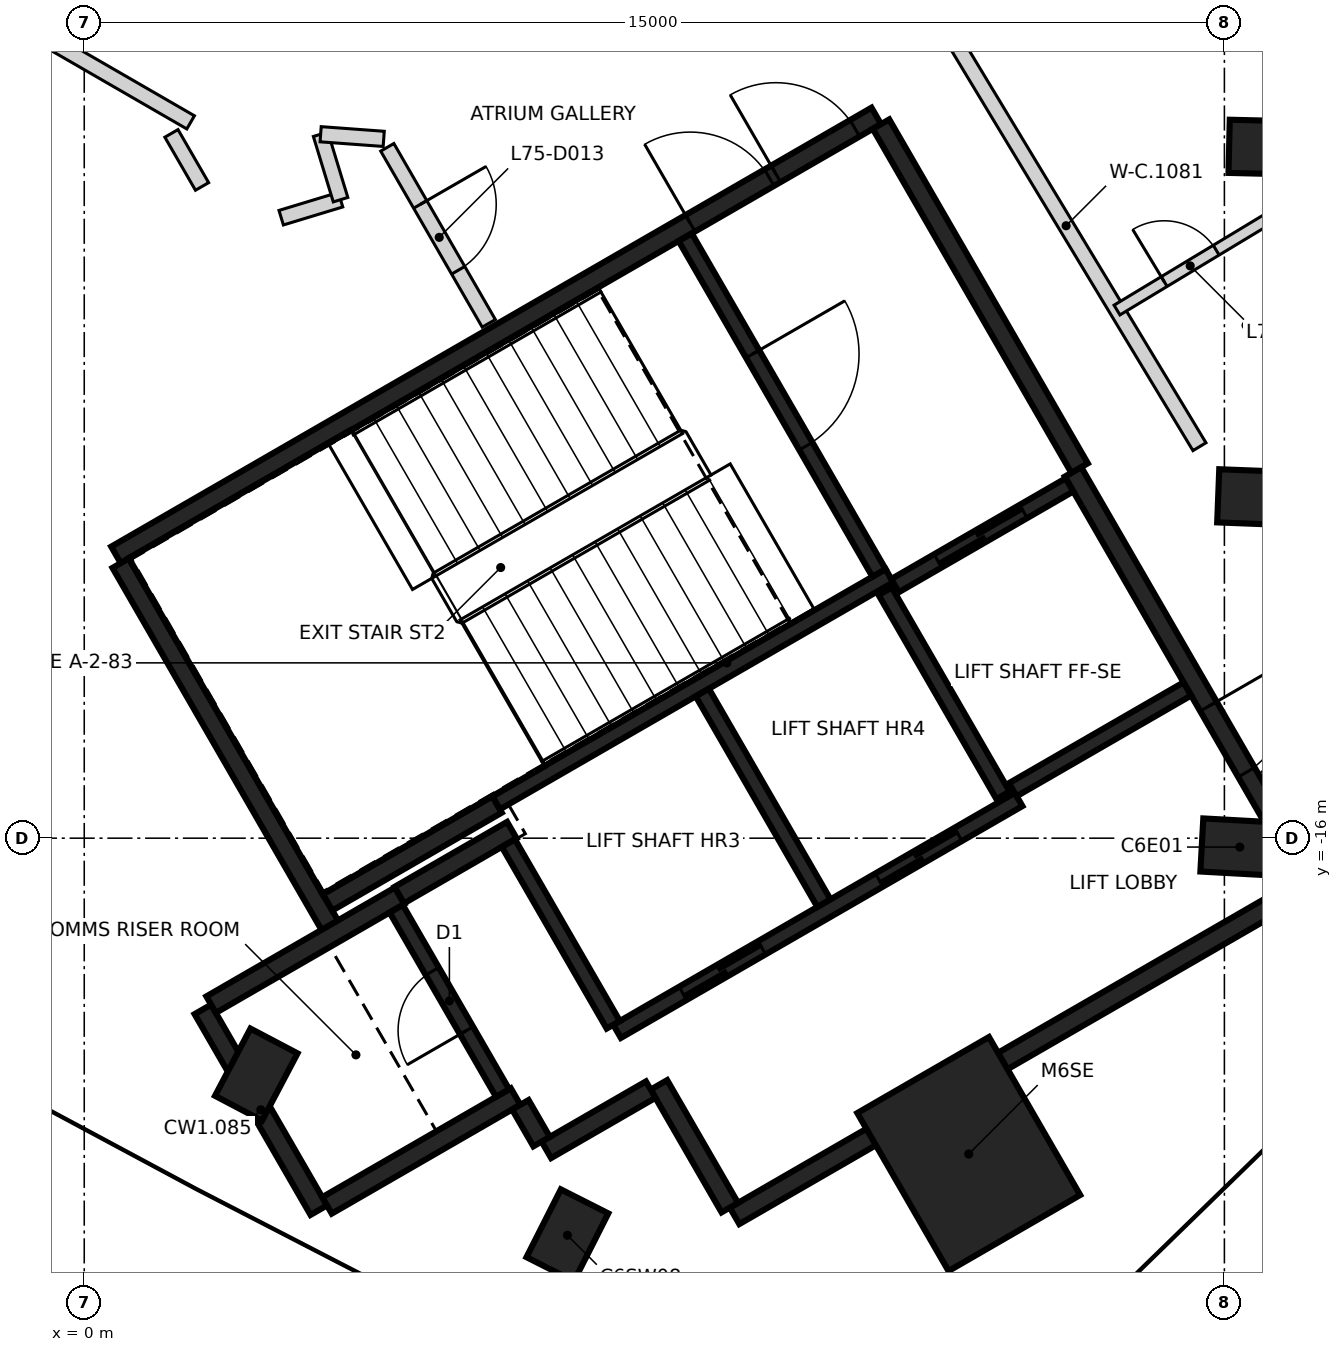
"""IFC4 building model, lengths in metres.
Left out: names, types, materials, properties, quantities, classifications, styles, units other than length and angle.
Written with IfcOpenShell. Run it as: python <this file> out.ifc"""

import sys

from ifc_helpers import new_model, si_unit, direction, frame, frame_2d, origin, origin_2d, place, context, subcontext, project, spatial, rectangle, extrude, element, fill, save


model = new_model("IFC4")
c1 = context("Model", 3, precision=1e-05, world=origin(), true_north=direction((0.0, 1.0)))
c2 = subcontext(c1, "Body", "Model", "MODEL_VIEW")
j1 = project(units=[si_unit("LENGTHUNIT", "METRE"), si_unit("PLANEANGLEUNIT", "RADIAN")], contexts=[c1])
p1 = place(None, origin())
s1 = spatial("IfcSite", under=j1, at=p1, CompositionType="ELEMENT")
p2 = place(p1, origin())
s2 = spatial("IfcBuilding", under=s1, at=p2, CompositionType="ELEMENT")
p3 = place(p2, frame((0.0, 0.0, 298.2)))
s3 = spatial("IfcBuildingStorey", under=s2, at=p3, CompositionType="ELEMENT", Elevation=298.2)
for number, where, z_axis, x_axis in (
    (1, (15.202, -16.117, -0.35), (0.0, 0.0, 1.0), (-0.998, 0.055, 0.0)),
    (2, (15.418, -11.515, -0.35), (0.0, 0.0, 1.0), (-0.999, 0.039, 0.0)),
    (3, (15.562, -6.91, -0.35), (0.0, 0.0, 1.0), (-1.0, 0.024, 0.0)),
    (4, (2.263, -19.11, -0.35), (0.0, 0.0, 1.0), (0.466, 0.885, 0.0)),
    (5, (6.356, -21.224, -0.35), (0.0, 0.0, 1.0), (0.452, 0.892, 0.0)),
):
    element("IfcColumn", number, at=place(p3, frame(where, z_axis=z_axis, x_axis=x_axis)), inside=s3, PredefinedType="COLUMN", context=c2, shape_type="SweptSolid", body=[
        extrude(rectangle(XDim=1.0, YDim=0.7, at=origin_2d()), origin(), (0.0, 0.0, 1.0), 2.64),
    ])
p4 = place(p3, frame((11.637, -20.155, -0.35), z_axis=(0.0, 0.0, 1.0), x_axis=(-0.5, 0.866025403784, 0.0)))
e6 = element("IfcColumn", 6, at=p4, inside=s3, PredefinedType="COLUMN", context=c2, shape_type="SweptSolid", body=[
    extrude(rectangle(XDim=2.4, YDim=2.0, at=origin_2d()), origin(), (0.0, 0.0, 1.0), 3.55),
])
p5 = place(p3, frame((0.417, -12.273, 0.0), z_axis=(0.0, 0.0, 1.0), x_axis=(0.866021906294, 0.500006057782, 0.0)))
e7 = element("IfcWall", 7, at=p5, inside=s3, PredefinedType="SHEAR", context=c2, shape_type="SweptSolid", body=[
    extrude(rectangle(XDim=11.55, YDim=0.25, at=frame_2d((5.775, 0.0))), origin(), (0.0, 0.0, 1.0), 3.2),
])
p6 = place(p5, frame((10.025, 0.0, 0.0)))
e8 = element("IfcOpeningElement", 8, at=p6, cuts=e7, PredefinedType="OPENING", context=c2, shape_type="SweptSolid", body=[
    extrude(rectangle(XDim=1.2, YDim=2.1, at=frame_2d((0.6, 1.05))), frame((0.0, 0.135, 0.0), z_axis=(0.0, -1.0, 0.0), x_axis=(1.0, 0.0, 0.0)), (0.0, 0.0, 1.0), 0.27),
])
p7 = place(p5, frame((8.725, 0.0, 0.0)))
e9 = element("IfcOpeningElement", 9, at=p7, cuts=e7, PredefinedType="OPENING", context=c2, shape_type="SweptSolid", body=[
    extrude(rectangle(XDim=1.2, YDim=2.1, at=frame_2d((0.6, 1.05))), frame((0.0, 0.135, 0.0), z_axis=(0.0, -1.0, 0.0), x_axis=(1.0, 0.0, 0.0)), (0.0, 0.0, 1.0), 0.27),
])
p8 = place(p3, frame((16.133, -16.594, 0.0), z_axis=(0.0, 0.0, 1.0), x_axis=(-0.866022959057, -0.500004234368, 0.0)))
e10 = element("IfcWall", 10, at=p8, inside=s3, PredefinedType="SHEAR", context=c2, shape_type="SweptSolid", body=[
    extrude(rectangle(XDim=8.75, YDim=0.25, at=frame_2d((4.375, 0.0))), origin(), (0.0, 0.0, 1.0), 3.2),
])
p9 = place(p3, frame((13.008, -11.181, 0.0), z_axis=(0.0, 0.0, 1.0), x_axis=(0.500001955336, -0.866024274868, 0.0)))
e11 = element("IfcWall", 11, at=p9, inside=s3, PredefinedType="SHEAR", context=c2, shape_type="SweptSolid", body=[
    extrude(rectangle(XDim=6.125, YDim=0.25, at=frame_2d((3.062, 0.0))), origin(), (0.0, 0.0, 1.0), 3.2),
])
p10 = place(p9, frame((3.563, 0.0, 0.0)))
e12 = element("IfcOpeningElement", 12, at=p10, cuts=e11, PredefinedType="OPENING", context=c2, shape_type="SweptSolid", body=[
    extrude(rectangle(XDim=1.0, YDim=2.1, at=frame_2d((0.5, 1.05))), frame((0.0, 0.135, 0.0), z_axis=(0.0, -1.0, 0.0), x_axis=(1.0, 0.0, 0.0)), (0.0, 0.0, 1.0), 0.27),
])
p11 = place(p3, frame((3.235, -17.153, 0.0), z_axis=(0.0, 0.0, 1.0), x_axis=(-0.500008851346, 0.866020293397, 0.0)))
e13 = element("IfcWall", 13, at=p11, inside=s3, PredefinedType="SHEAR", context=c2, shape_type="SweptSolid", body=[
    extrude(rectangle(XDim=5.51, YDim=0.25, at=frame_2d((2.755, 0.0))), origin(), (0.0, 0.0, 1.0), 3.2),
])
p12 = place(p3, frame((10.483, -6.606, 0.0), z_axis=(0.0, 0.0, 1.0), x_axis=(0.49999885962, -0.866026062182, 0.0)))
e14 = element("IfcWall", 14, at=p12, inside=s3, PredefinedType="SHEAR", context=c2, shape_type="SweptSolid", body=[
    extrude(rectangle(XDim=5.225, YDim=0.25, at=frame_2d((2.612, 0.0))), origin(), (0.0, 0.0, 1.0), 3.2),
])
p13 = place(p3, frame((3.085, -20.894, 0.0), z_axis=(0.0, 0.0, 1.0), x_axis=(-0.499978833458, 0.866037623948, 0.0)))
e15 = element("IfcWall", 15, at=p13, inside=s3, PredefinedType="SHEAR", context=c2, shape_type="SweptSolid", body=[
    extrude(rectangle(XDim=3.05, YDim=0.25, at=frame_2d((1.525, 0.0))), origin(), (0.0, 0.0, 1.0), 3.2),
])
p14 = place(p3, frame((1.669, -18.19, 0.0), z_axis=(0.0, 0.0, 1.0), x_axis=(0.866042235819, 0.499970844928, 0.0)))
e16 = element("IfcWall", 16, at=p14, inside=s3, PredefinedType="SHEAR", context=c2, shape_type="SweptSolid", body=[
    extrude(rectangle(XDim=2.865, YDim=0.25, at=frame_2d((1.432, 0.0))), origin(), (0.0, 0.0, 1.0), 3.2),
])
p15 = place(p3, frame((5.675, -19.399, 0.0), z_axis=(0.0, 0.0, 1.0), x_axis=(-0.866026637627, -0.499997862916, 0.0)))
e17 = element("IfcWall", 17, at=p15, inside=s3, PredefinedType="SHEAR", context=c2, shape_type="SweptSolid", body=[
    extrude(rectangle(XDim=2.865, YDim=0.25, at=frame_2d((1.432, 0.0))), origin(), (0.0, 0.0, 1.0), 3.2),
])
p16 = place(p3, frame((5.431, -15.556, 0.0), z_axis=(0.0, 0.0, 1.0), x_axis=(-0.866022940537, -0.500004266446, 0.0)))
e18 = element("IfcWall", 18, at=p16, inside=s3, PredefinedType="SHEAR", context=c2, shape_type="SweptSolid", body=[
    extrude(rectangle(XDim=2.575, YDim=0.25, at=frame_2d((1.287, 0.0))), origin(), (0.0, 0.0, 1.0), 3.2),
])
p17 = place(p3, frame((8.493, -20.86, 0.0), z_axis=(0.0, 0.0, 1.0), x_axis=(-0.500039802285, 0.866002422705, 0.0)))
e19 = element("IfcWall", 19, at=p17, inside=s3, PredefinedType="SHEAR", context=c2, shape_type="SweptSolid", body=[
    extrude(rectangle(XDim=1.865, YDim=0.25, at=frame_2d((0.932, 0.0))), origin(), (0.0, 0.0, 1.0), 3.2),
])
p18 = place(p3, frame((4.145, -16.749, 0.0), z_axis=(0.0, 0.0, 1.0), x_axis=(0.866038183914, 0.499977863513, 0.0)))
e20 = element("IfcWall", 20, at=p18, inside=s3, PredefinedType="SHEAR", context=c2, shape_type="SweptSolid", body=[
    extrude(rectangle(XDim=1.71, YDim=0.25, at=frame_2d((0.855, 0.0))), origin(), (0.0, 0.0, 1.0), 3.2),
])
p19 = place(p3, frame((7.452, -19.308, 0.0), z_axis=(0.0, 0.0, 1.0), x_axis=(-0.866044474677, -0.49996696679, 0.0)))
e21 = element("IfcWall", 21, at=p19, inside=s3, PredefinedType="SHEAR", context=c2, shape_type="SweptSolid", body=[
    extrude(rectangle(XDim=1.584, YDim=0.25, at=frame_2d((0.792, 0.0))), origin(), (0.0, 0.0, 1.0), 3.2),
])
p20 = place(p3, frame((6.017, -19.992, 0.0), z_axis=(0.0, 0.0, 1.0), x_axis=(-0.500364886717, 0.865814633822, 0.0)))
e22 = element("IfcWall", 22, at=p20, inside=s3, PredefinedType="SHEAR", context=c2, shape_type="SweptSolid", body=[
    extrude(rectangle(XDim=0.559, YDim=0.25, at=frame_2d((0.28, 0.0))), origin(), (0.0, 0.0, 1.0), 3.2),
])
p21 = place(p3, frame((5.419, -15.534, 0.0), z_axis=(0.0, 0.0, 1.0), x_axis=(0.866029065029, 0.499993658486, 0.0)))
e23 = element("IfcWall", 23, at=p21, inside=s3, PredefinedType="SHEAR", context=c2, shape_type="SweptSolid", body=[
    extrude(rectangle(XDim=5.974, YDim=0.2, at=frame_2d((2.987, 0.0))), origin(), (0.0, 0.0, 1.0), 3.2),
])
p22 = place(p3, frame((7.01, -18.542, 0.0), z_axis=(0.0, 0.0, 1.0), x_axis=(0.866030299012, 0.499991521122, 0.0)))
e24 = element("IfcWall", 24, at=p22, inside=s3, PredefinedType="SHEAR", context=c2, shape_type="SweptSolid", body=[
    extrude(rectangle(XDim=6.1, YDim=0.2, at=frame_2d((3.05, 0.0))), origin(), (0.0, 0.0, 1.0), 3.2),
])
p23 = place(p22, frame((1.0, 0.0, 0.0)))
e25 = element("IfcOpeningElement", 25, at=p23, cuts=e24, PredefinedType="OPENING", context=c2, shape_type="SweptSolid", body=[
    extrude(rectangle(XDim=1.2, YDim=2.1, at=frame_2d((0.6, 1.05))), frame((0.0, 0.11, 0.0), z_axis=(0.0, -1.0, 0.0), x_axis=(1.0, 0.0, 0.0)), (0.0, 0.0, 1.0), 0.22),
])
p24 = place(p22, frame((3.982, 0.0, 0.0)))
e26 = element("IfcOpeningElement", 26, at=p24, cuts=e24, PredefinedType="OPENING", context=c2, shape_type="SweptSolid", body=[
    extrude(rectangle(XDim=1.2, YDim=2.1, at=frame_2d((0.6, 1.05))), frame((0.0, 0.11, 0.0), z_axis=(0.0, -1.0, 0.0), x_axis=(1.0, 0.0, 0.0)), (0.0, 0.0, 1.0), 0.22),
])
p25 = place(p3, frame((7.906, -8.094, 0.0), z_axis=(0.0, 0.0, 1.0), x_axis=(0.500027839223, -0.866009330205, 0.0)))
e27 = element("IfcWall", 27, at=p25, inside=s3, PredefinedType="SHEAR", context=c2, shape_type="SweptSolid", body=[
    extrude(rectangle(XDim=5.098, YDim=0.2, at=frame_2d((2.549, 0.0))), origin(), (0.0, 0.0, 1.0), 3.2),
])
p26 = place(p25, frame((1.774, 0.0, 0.0)))
e28 = element("IfcOpeningElement", 28, at=p26, cuts=e27, PredefinedType="OPENING", context=c2, shape_type="SweptSolid", body=[
    extrude(rectangle(XDim=1.4, YDim=2.1, at=frame_2d((0.7, 1.05))), frame((0.0, 0.11, 0.0), z_axis=(0.0, -1.0, 0.0), x_axis=(1.0, 0.0, 0.0)), (0.0, 0.0, 1.0), 0.22),
])
p27 = place(p3, frame((8.132, -14.084, 0.0), z_axis=(0.0, 0.0, 1.0), x_axis=(0.499997778408, -0.866026686418, 0.0)))
e29 = element("IfcWall", 29, at=p27, inside=s3, PredefinedType="SHEAR", context=c2, shape_type="SweptSolid", body=[
    extrude(rectangle(XDim=3.198, YDim=0.2, at=frame_2d((1.599, 0.0))), origin(), (0.0, 0.0, 1.0), 3.2),
])
p28 = place(p3, frame((5.503, -19.352, 0.0), z_axis=(0.0, 0.0, 1.0), x_axis=(-0.499986818241, 0.866033014143, 0.0)))
e30 = element("IfcWall", 30, at=p28, inside=s3, PredefinedType="SHEAR", context=c2, shape_type="SweptSolid", body=[
    extrude(rectangle(XDim=2.798, YDim=0.2, at=frame_2d((1.399, 0.0))), origin(), (0.0, 0.0, 1.0), 3.2),
])
p29 = place(p28, frame((0.949, 0.0, 0.0)))
e31 = element("IfcOpeningElement", 31, at=p29, cuts=e30, PredefinedType="OPENING", context=c2, shape_type="SweptSolid", body=[
    extrude(rectangle(XDim=0.9, YDim=2.1, at=frame_2d((0.45, 1.05))), frame((0.0, 0.11, 0.0), z_axis=(0.0, -1.0, 0.0), x_axis=(1.0, 0.0, 0.0)), (0.0, 0.0, 1.0), 0.22),
])
p30 = place(p3, frame((6.96, -18.455, 0.0), z_axis=(0.0, 0.0, 1.0), x_axis=(-0.499926705758, 0.866067716099, 0.0)))
e32 = element("IfcWall", 32, at=p30, inside=s3, PredefinedType="SHEAR", context=c2, shape_type="SweptSolid", body=[
    extrude(rectangle(XDim=2.759, YDim=0.2, at=frame_2d((1.38, 0.0))), origin(), (0.0, 0.0, 1.0), 3.2),
])
p31 = place(p3, frame((12.088, -15.437, 0.0), z_axis=(0.0, 0.0, 1.0), x_axis=(-0.500026960575, 0.86600983753, 0.0)))
e33 = element("IfcWall", 33, at=p31, inside=s3, PredefinedType="SHEAR", context=c2, shape_type="SweptSolid", body=[
    extrude(rectangle(XDim=3.1, YDim=0.2, at=frame_2d((1.55, 0.0))), origin(), (0.0, 0.0, 1.0), 3.2),
])
p32 = place(p3, frame((10.666, -12.678, 0.0), z_axis=(0.0, 0.0, 1.0), x_axis=(0.866018407898, 0.500012117035, 0.0)))
e34 = element("IfcWall", 34, at=p32, inside=s3, PredefinedType="SHEAR", context=c2, shape_type="SweptSolid", body=[
    extrude(rectangle(XDim=2.651, YDim=0.2, at=frame_2d((1.325, 0.0))), origin(), (0.0, 0.0, 1.0), 3.2),
])
p33 = place(p32, frame((0.652, 0.0, 0.0)))
e35 = element("IfcOpeningElement", 35, at=p33, cuts=e34, PredefinedType="OPENING", context=c2, shape_type="SweptSolid", body=[
    extrude(rectangle(XDim=1.3, YDim=2.1, at=frame_2d((0.65, 1.05))), frame((0.0, 0.11, 0.0), z_axis=(0.0, -1.0, 0.0), x_axis=(1.0, 0.0, 0.0)), (0.0, 0.0, 1.0), 0.22),
])
p34 = place(p3, frame((14.512, -14.037, 0.0), z_axis=(0.0, 0.0, 1.0), x_axis=(-0.866018407898, -0.500012117035, 0.0)))
e36 = element("IfcWall", 36, at=p34, inside=s3, PredefinedType="SHEAR", context=c2, shape_type="SweptSolid", body=[
    extrude(rectangle(XDim=2.651, YDim=0.2, at=frame_2d((1.325, 0.0))), origin(), (0.0, 0.0, 1.0), 3.2),
])
p35 = place(p3, frame((-4.505, -3.171, 0.0), z_axis=(0.0, 0.0, 1.0), x_axis=(0.865849219471, -0.500305036094, 0.0)))
e37 = element("IfcWall", 37, at=p35, inside=s3, PredefinedType="PARTITIONING", context=c2, shape_type="SweptSolid", body=[
    extrude(rectangle(XDim=6.819, YDim=0.2, at=frame_2d((3.41, 0.0))), origin(), (0.0, 0.0, 1.0), 3.2),
])
p36 = place(p35, frame((3.481, 0.0, 0.0)))
e38 = element("IfcOpeningElement", 38, at=p36, cuts=e37, PredefinedType="OPENING", context=c2, shape_type="SweptSolid", body=[
    extrude(rectangle(XDim=0.95, YDim=2.1, at=frame_2d((0.475, 1.05))), frame((0.0, 0.11, 0.0), z_axis=(0.0, -1.0, 0.0), x_axis=(1.0, 0.0, 0.0)), (0.0, 0.0, 1.0), 0.22),
])
p37 = place(p3, frame((1.147, -6.728, 0.0), z_axis=(0.0, 0.0, 1.0), x_axis=(0.500080775649, -0.865978762919, 0.0)))
e39 = element("IfcWall", 39, at=p37, inside=s3, PredefinedType="PARTITIONING", context=c2, shape_type="SweptSolid", body=[
    extrude(rectangle(XDim=0.806, YDim=0.2, at=frame_2d((0.403, 0.0))), origin(), (0.0, 0.0, 1.0), 3.2),
])
p38 = place(p3, frame((2.591, -7.837, 0.0), z_axis=(0.0, 0.0, 1.0), x_axis=(0.956974070788, 0.290173444409, 0.0)))
e40 = element("IfcWall", 40, at=p38, inside=s3, PredefinedType="PARTITIONING", context=c2, shape_type="SweptSolid", body=[
    extrude(rectangle(XDim=0.816, YDim=0.2, at=frame_2d((0.408, 0.0))), origin(), (0.0, 0.0, 1.0), 3.2),
])
p39 = place(p3, frame((3.11, -6.739, 0.0), z_axis=(0.0, 0.0, 1.0), x_axis=(0.291053676179, -0.95670672496, 0.0)))
e41 = element("IfcWall", 41, at=p39, inside=s3, PredefinedType="PARTITIONING", context=c2, shape_type="SweptSolid", body=[
    extrude(rectangle(XDim=0.9, YDim=0.2, at=frame_2d((0.45, 0.0))), origin(), (0.0, 0.0, 1.0), 3.2),
])
p40 = place(p3, frame((3.11, -6.739, 0.0), z_axis=(0.0, 0.0, 1.0), x_axis=(0.997306047238, -0.073352901386, 0.0)))
e42 = element("IfcWall", 42, at=p40, inside=s3, PredefinedType="PARTITIONING", context=c2, shape_type="SweptSolid", body=[
    extrude(rectangle(XDim=0.832, YDim=0.2, at=frame_2d((0.416, 0.0))), origin(), (0.0, 0.0, 1.0), 3.2),
])
p41 = place(p3, frame((3.987, -6.911, 0.0), z_axis=(0.0, 0.0, 1.0), x_axis=(0.499458942258, -0.866337558345, 0.0)))
e43 = element("IfcWall", 43, at=p41, inside=s3, PredefinedType="PARTITIONING", context=c2, shape_type="SweptSolid", body=[
    extrude(rectangle(XDim=2.674, YDim=0.2, at=frame_2d((1.337, 0.0))), origin(), (0.0, 0.0, 1.0), 3.2),
])
p42 = place(p41, frame((0.867, 0.0, 0.0)))
e44 = element("IfcOpeningElement", 44, at=p42, cuts=e43, PredefinedType="OPENING", context=c2, shape_type="SweptSolid", body=[
    extrude(rectangle(XDim=1.0, YDim=2.1, at=frame_2d((0.5, 1.05))), frame((0.0, 0.11, 0.0), z_axis=(0.0, -1.0, 0.0), x_axis=(1.0, 0.0, 0.0)), (0.0, 0.0, 1.0), 0.22),
])
p43 = place(p3, frame((11.163, -5.036, 0.0), z_axis=(0.0, 0.0, 1.0), x_axis=(0.516730398198, -0.856148173845, 0.0)))
e45 = element("IfcWall", 45, at=p43, inside=s3, PredefinedType="PARTITIONING", context=c2, shape_type="SweptSolid", body=[
    extrude(rectangle(XDim=6.791, YDim=0.2, at=frame_2d((3.396, 0.0))), origin(), (0.0, 0.0, 1.0), 3.2),
])
p44 = place(p3, frame((15.55, -15.213, 0.0), z_axis=(0.0, 0.0, 1.0), x_axis=(0.865989998118, 0.500061319399, 0.0)))
e46 = element("IfcWall", 46, at=p44, inside=s3, PredefinedType="PARTITIONING", context=c2, shape_type="SweptSolid", body=[
    extrude(rectangle(XDim=0.79, YDim=0.2, at=frame_2d((0.395, 0.0))), origin(), (0.0, 0.0, 1.0), 3.2),
])
p45 = place(p3, frame((13.587, -9.052, 0.0), z_axis=(0.0, 0.0, 1.0), x_axis=(0.856117294569, 0.516781557275, 0.0)))
e47 = element("IfcWall", 47, at=p45, inside=s3, PredefinedType="PARTITIONING", context=c2, shape_type="SweptSolid", body=[
    extrude(rectangle(XDim=2.699, YDim=0.15, at=frame_2d((1.35, 0.0))), origin(), (0.0, 0.0, 1.0), 2.29),
])
p46 = place(p45, frame((0.725, 0.0, 0.0)))
e48 = element("IfcOpeningElement", 48, at=p46, cuts=e47, PredefinedType="OPENING", context=c2, shape_type="SweptSolid", body=[
    extrude(rectangle(XDim=0.8, YDim=2.1, at=frame_2d((0.4, 1.05))), frame((0.0, 0.085, 0.0), z_axis=(0.0, -1.0, 0.0), x_axis=(1.0, 0.0, 0.0)), (0.0, 0.0, 1.0), 0.17),
])
p47 = place(p33, origin())
e49 = element("IfcDoor", 49, at=p47, inside=s3, OperationType="SLIDING_TO_RIGHT", PredefinedType="DOOR", context=c2, shape_type="SweptSolid", body=[
    extrude(rectangle(XDim=1.3, YDim=2.1, at=frame_2d((0.65, 1.05))), frame((0.0, 0.025, 0.0), z_axis=(0.0, -1.0, 0.0), x_axis=(1.0, 0.0, 0.0)), (0.0, 0.0, 1.0), 0.05),
])
fill(e35, e49)
p48 = place(p23, origin())
e50 = element("IfcDoor", 50, at=p48, inside=s3, OperationType="DOUBLE_DOOR_SLIDING", PredefinedType="DOOR", context=c2, shape_type="SweptSolid", body=[
    extrude(rectangle(XDim=1.2, YDim=2.1, at=frame_2d((0.6, 1.05))), frame((0.0, 0.025, 0.0), z_axis=(0.0, -1.0, 0.0), x_axis=(1.0, 0.0, 0.0)), (0.0, 0.0, 1.0), 0.05),
])
fill(e25, e50)
p49 = place(p24, origin())
e51 = element("IfcDoor", 51, at=p49, inside=s3, OperationType="DOUBLE_DOOR_SLIDING", PredefinedType="DOOR", context=c2, shape_type="SweptSolid", body=[
    extrude(rectangle(XDim=1.2, YDim=2.1, at=frame_2d((0.6, 1.05))), frame((0.0, 0.025, 0.0), z_axis=(0.0, -1.0, 0.0), x_axis=(1.0, 0.0, 0.0)), (0.0, 0.0, 1.0), 0.05),
])
fill(e26, e51)
p50 = place(p10, origin())
e52 = element("IfcDoor", 52, at=p50, inside=s3, OperationType="SINGLE_SWING_LEFT", PredefinedType="DOOR", context=c2, shape_type="SweptSolid", body=[
    extrude(rectangle(XDim=1.0, YDim=2.1, at=frame_2d((0.5, 1.05))), frame((0.0, 0.025, 0.0), z_axis=(0.0, -1.0, 0.0), x_axis=(1.0, 0.0, 0.0)), (0.0, 0.0, 1.0), 0.05),
])
fill(e12, e52)
p51 = place(p6, origin())
e53 = element("IfcDoor", 53, at=p51, inside=s3, OperationType="SINGLE_SWING_LEFT", PredefinedType="DOOR", context=c2, shape_type="SweptSolid", body=[
    extrude(rectangle(XDim=1.2, YDim=2.1, at=frame_2d((0.6, 1.05))), frame((0.0, 0.025, 0.0), z_axis=(0.0, -1.0, 0.0), x_axis=(1.0, 0.0, 0.0)), (0.0, 0.0, 1.0), 0.05),
])
fill(e8, e53)
p52 = place(p7, origin())
e54 = element("IfcDoor", 54, at=p52, inside=s3, OperationType="SINGLE_SWING_RIGHT", PredefinedType="DOOR", context=c2, shape_type="SweptSolid", body=[
    extrude(rectangle(XDim=1.2, YDim=2.1, at=frame_2d((0.6, 1.05))), frame((0.0, 0.025, 0.0), z_axis=(0.0, -1.0, 0.0), x_axis=(1.0, 0.0, 0.0)), (0.0, 0.0, 1.0), 0.05),
])
fill(e9, e54)
p53 = place(p26, origin())
e55 = element("IfcDoor", 55, at=p53, inside=s3, OperationType="SINGLE_SWING_RIGHT", PredefinedType="DOOR", context=c2, shape_type="SweptSolid", body=[
    extrude(rectangle(XDim=1.4, YDim=2.1, at=frame_2d((0.7, 1.05))), frame((0.0, 0.025, 0.0), z_axis=(0.0, -1.0, 0.0), x_axis=(1.0, 0.0, 0.0)), (0.0, 0.0, 1.0), 0.05),
])
fill(e28, e55)
p54 = place(p29, origin())
e56 = element("IfcDoor", 56, at=p54, inside=s3, OperationType="SINGLE_SWING_LEFT", PredefinedType="DOOR", context=c2, shape_type="SweptSolid", body=[
    extrude(rectangle(XDim=0.9, YDim=2.1, at=frame_2d((0.45, 1.05))), frame((0.0, 0.025, 0.0), z_axis=(0.0, -1.0, 0.0), x_axis=(1.0, 0.0, 0.0)), (0.0, 0.0, 1.0), 0.05),
])
fill(e31, e56)
p55 = place(p46, origin())
e57 = element("IfcDoor", 57, at=p55, inside=s3, OperationType="SINGLE_SWING_LEFT", PredefinedType="DOOR", context=c2, shape_type="SweptSolid", body=[
    extrude(rectangle(XDim=0.8, YDim=2.1, at=frame_2d((0.4, 1.05))), frame((0.0, 0.025, 0.0), z_axis=(0.0, -1.0, 0.0), x_axis=(1.0, 0.0, 0.0)), (0.0, 0.0, 1.0), 0.05),
])
fill(e48, e57)
p56 = place(p42, frame((1.0, 0.0, 0.0), z_axis=(0.0, 0.0, 1.0), x_axis=(-1.0, 0.0, 0.0)))
e58 = element("IfcDoor", 58, at=p56, inside=s3, OperationType="SINGLE_SWING_LEFT", PredefinedType="DOOR", context=c2, shape_type="SweptSolid", body=[
    extrude(rectangle(XDim=1.0, YDim=2.1, at=frame_2d((0.5, 1.05))), frame((0.0, 0.025, 0.0), z_axis=(0.0, -1.0, 0.0), x_axis=(1.0, 0.0, 0.0)), (0.0, 0.0, 1.0), 0.05),
])
fill(e44, e58)
save(model, sys.argv[1])
